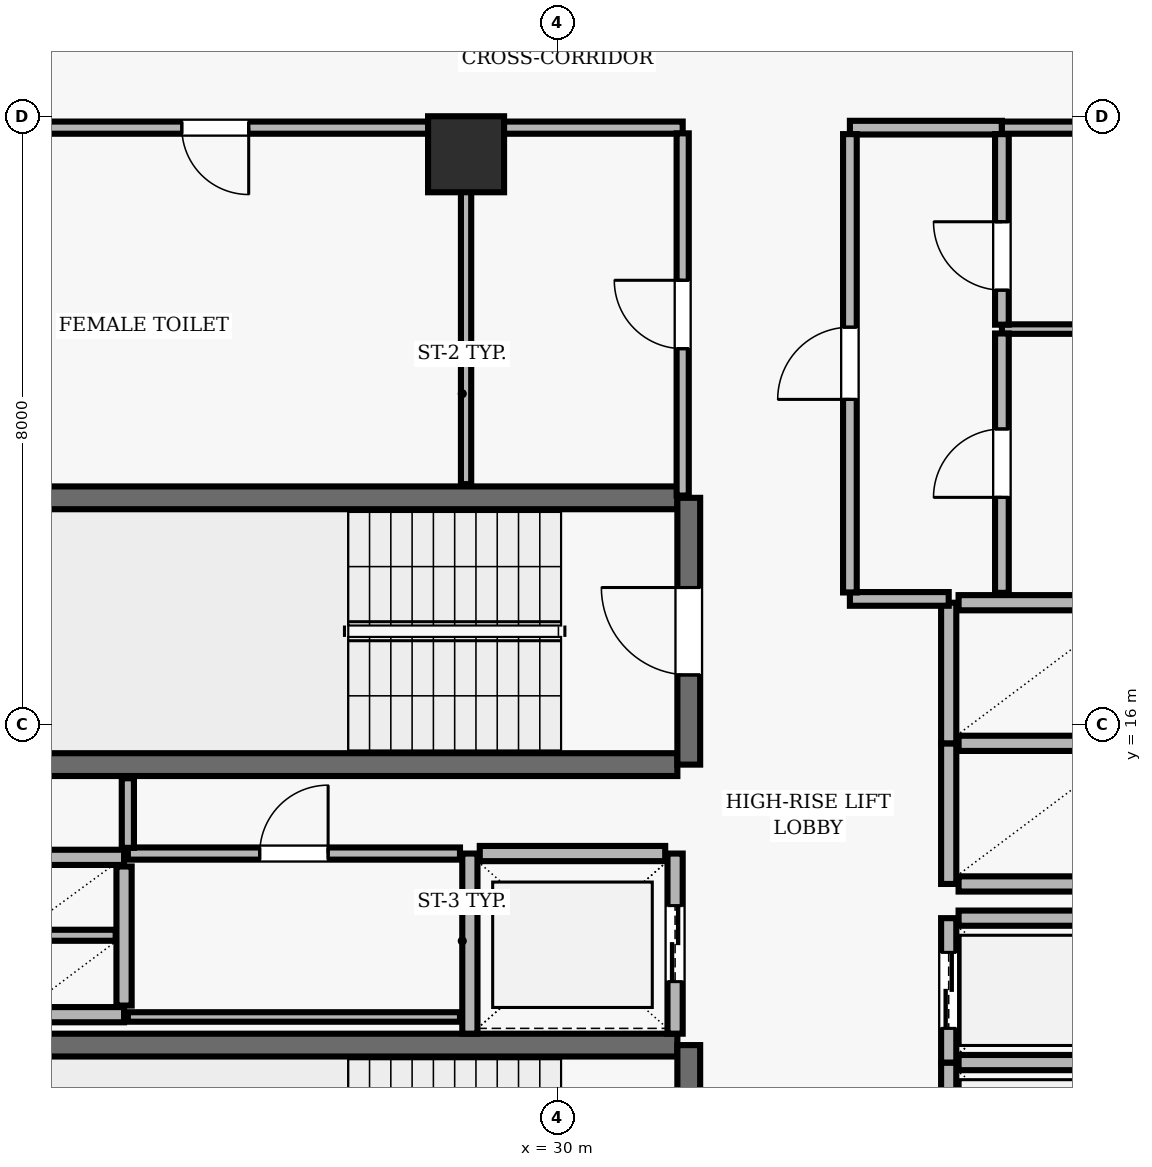
"""IFC4 building model, lengths in metres.
Left out: names, types, materials, properties, quantities, classifications, styles, units other than length and angle.
Written with IfcOpenShell. Run it as: python <this file> out.ifc"""

import sys

from ifc_helpers import new_model, si_unit, direction, frame, frame_2d, origin, origin_2d, place, context, subcontext, project, spatial, rectangle, extrude, element, fill, save


model = new_model("IFC4")
c1 = context("Model", 3, precision=1e-05, world=origin(), true_north=direction((0.0, 1.0)))
c2 = subcontext(c1, "Body", "Model", "MODEL_VIEW")
j1 = project(units=[si_unit("LENGTHUNIT", "METRE"), si_unit("PLANEANGLEUNIT", "RADIAN")], contexts=[c1])
p1 = place(None, origin())
s1 = spatial("IfcSite", under=j1, at=p1, CompositionType="ELEMENT")
p2 = place(p1, origin())
s2 = spatial("IfcBuilding", under=s1, at=p2, CompositionType="ELEMENT")
p3 = place(p2, frame((0.0, 0.0, 230.4)))
s3 = spatial("IfcBuildingStorey", under=s2, at=p3, CompositionType="ELEMENT", Elevation=230.4)
p4 = place(p3, frame((28.8, 23.5, 0.0), z_axis=(0.0, 0.0, 1.0), x_axis=(1.0, 0.0, 0.0)))
e1 = element("IfcColumn", 1, at=p4, inside=s3, PredefinedType="COLUMN", context=c2, shape_type="SweptSolid", body=[
    extrude(rectangle(XDim=1.0, YDim=1.0, at=origin_2d()), origin(), (0.0, 0.0, 1.0), 3.9),
])
for number, where, z_axis, x_axis in (
    (2, (31.58, 18.98, 0.0), (0.0, 0.0, 1.0), (-1.0, 0.0, 0.0)),
    (3, (23.22, 15.47, 0.0), (0.0, 0.0, 1.0), (1.0, 0.0, 0.0)),
):
    element("IfcWall", number, at=place(p3, frame(where, z_axis=z_axis, x_axis=x_axis)), inside=s3, PredefinedType="SHEAR", context=c2, shape_type="SweptSolid", body=[
        extrude(rectangle(XDim=8.36, YDim=0.3, at=frame_2d((4.18, 0.0))), origin(), (0.0, 0.0, 1.0), 3.69),
    ])
p5 = place(p3, frame((31.73, 15.47, 0.0), z_axis=(0.0, 0.0, 1.0), x_axis=(0.0, 1.0, 0.0)))
e4 = element("IfcWall", 4, at=p5, inside=s3, PredefinedType="SHEAR", context=c2, shape_type="SweptSolid", body=[
    extrude(rectangle(XDim=3.51, YDim=0.3, at=frame_2d((1.755, 0.0))), origin(), (0.0, 0.0, 1.0), 3.69),
])
p6 = place(p5, frame((1.18, 0.0, 0.0)))
e5 = element("IfcOpeningElement", 5, at=p6, cuts=e4, PredefinedType="OPENING", context=c2, shape_type="SweptSolid", body=[
    extrude(rectangle(XDim=1.15, YDim=2.15, at=frame_2d((0.575, 1.075))), frame((0.0, 0.16, 0.0), z_axis=(0.0, -1.0, 0.0), x_axis=(1.0, 0.0, 0.0)), (0.0, 0.0, 1.0), 0.32),
])
p7 = place(p3, frame((31.58, 11.78, 0.0), z_axis=(0.0, 0.0, 1.0), x_axis=(-1.0, 0.0, 0.0)))
e6 = element("IfcWall", 6, at=p7, inside=s3, PredefinedType="SHEAR", context=c2, shape_type="SweptSolid", body=[
    extrude(rectangle(XDim=8.36, YDim=0.3, at=frame_2d((4.18, 0.0))), origin(), (0.0, 0.0, 1.0), 3.69),
])
p8 = place(p3, frame((31.73, 8.27, 0.0), z_axis=(0.0, 0.0, 1.0), x_axis=(0.0, 1.0, 0.0)))
e7 = element("IfcWall", 7, at=p8, inside=s3, PredefinedType="SHEAR", context=c2, shape_type="SweptSolid", body=[
    extrude(rectangle(XDim=3.51, YDim=0.3, at=frame_2d((1.755, 0.0))), origin(), (0.0, 0.0, 1.0), 3.69),
])
p9 = place(p8, frame((1.18, 0.0, 0.0)))
e8 = element("IfcOpeningElement", 8, at=p9, cuts=e7, PredefinedType="OPENING", context=c2, shape_type="SweptSolid", body=[
    extrude(rectangle(XDim=1.15, YDim=2.15, at=frame_2d((0.575, 1.075))), frame((0.0, 0.16, 0.0), z_axis=(0.0, -1.0, 0.0), x_axis=(1.0, 0.0, 0.0)), (0.0, 0.0, 1.0), 0.32),
])
p10 = place(p3, frame((35.15, 11.55, 0.0), z_axis=(0.0, 0.0, 1.0), x_axis=(0.0, -1.0, 0.0)))
e9 = element("IfcWall", 9, at=p10, inside=s3, PredefinedType="SOLIDWALL", context=c2, shape_type="SweptSolid", body=[
    extrude(rectangle(XDim=1.9, YDim=0.2, at=frame_2d((0.95, 0.0))), origin(), (0.0, 0.0, 1.0), 3.69),
])
p11 = place(p10, frame((0.45, 0.0, 0.0)))
e10 = element("IfcOpeningElement", 10, at=p11, cuts=e9, PredefinedType="OPENING", context=c2, shape_type="SweptSolid", body=[
    extrude(rectangle(XDim=1.0, YDim=2.1, at=frame_2d((0.5, 1.05))), frame((0.0, 0.11, 0.0), z_axis=(0.0, -1.0, 0.0), x_axis=(1.0, 0.0, 0.0)), (0.0, 0.0, 1.0), 0.22),
])
p12 = place(p3, frame((37.42, 11.55, 0.0), z_axis=(0.0, 0.0, 1.0), x_axis=(-1.0, 0.0, 0.0)))
e11 = element("IfcWall", 11, at=p12, inside=s3, PredefinedType="SOLIDWALL", context=c2, shape_type="SweptSolid", body=[
    extrude(rectangle(XDim=2.14, YDim=0.2, at=frame_2d((1.07, 0.0))), origin(), (0.0, 0.0, 1.0), 3.69),
])
p13 = place(p3, frame((35.15, 13.45, 0.0), z_axis=(0.0, 0.0, 1.0), x_axis=(0.0, -1.0, 0.0)))
e12 = element("IfcWall", 12, at=p13, inside=s3, PredefinedType="SOLIDWALL", context=c2, shape_type="SweptSolid", body=[
    extrude(rectangle(XDim=1.9, YDim=0.2, at=frame_2d((0.95, 0.0))), origin(), (0.0, 0.0, 1.0), 3.69),
])
p14 = place(p13, frame((0.45, 0.0, 0.0)))
e13 = element("IfcOpeningElement", 13, at=p14, cuts=e12, PredefinedType="OPENING", context=c2, shape_type="SweptSolid", body=[
    extrude(rectangle(XDim=1.0, YDim=2.1, at=frame_2d((0.5, 1.05))), frame((0.0, 0.11, 0.0), z_axis=(0.0, -1.0, 0.0), x_axis=(1.0, 0.0, 0.0)), (0.0, 0.0, 1.0), 0.22),
])
p15 = place(p3, frame((37.42, 13.45, 0.0), z_axis=(0.0, 0.0, 1.0), x_axis=(-1.0, 0.0, 0.0)))
e14 = element("IfcWall", 14, at=p15, inside=s3, PredefinedType="SOLIDWALL", context=c2, shape_type="SweptSolid", body=[
    extrude(rectangle(XDim=2.14, YDim=0.2, at=frame_2d((1.07, 0.0))), origin(), (0.0, 0.0, 1.0), 3.69),
])
p16 = place(p3, frame((28.85, 14.3, 0.0), z_axis=(0.0, 0.0, 1.0), x_axis=(0.0, -1.0, 0.0)))
e15 = element("IfcWall", 15, at=p16, inside=s3, PredefinedType="SOLIDWALL", context=c2, shape_type="SweptSolid", body=[
    extrude(rectangle(XDim=2.37, YDim=0.2, at=frame_2d((1.185, 0.0))), origin(), (0.0, 0.0, 1.0), 3.69),
])
p17 = place(p3, frame((31.55, 11.93, 0.0), z_axis=(0.0, 0.0, 1.0), x_axis=(0.0, 1.0, 0.0)))
e16 = element("IfcWall", 16, at=p17, inside=s3, PredefinedType="SOLIDWALL", context=c2, shape_type="SweptSolid", body=[
    extrude(rectangle(XDim=2.37, YDim=0.2, at=frame_2d((1.185, 0.0))), origin(), (0.0, 0.0, 1.0), 3.69),
])
p18 = place(p17, frame((0.685, 0.0, 0.0)))
e17 = element("IfcOpeningElement", 17, at=p18, cuts=e16, PredefinedType="OPENING", context=c2, shape_type="SweptSolid", body=[
    extrude(rectangle(XDim=1.0, YDim=2.1, at=frame_2d((0.5, 1.05))), frame((0.0, 0.11, 0.0), z_axis=(0.0, -1.0, 0.0), x_axis=(1.0, 0.0, 0.0)), (0.0, 0.0, 1.0), 0.22),
])
p19 = place(p3, frame((31.42, 14.3, 0.0), z_axis=(0.0, 0.0, 1.0), x_axis=(-1.0, 0.0, 0.0)))
e18 = element("IfcWall", 18, at=p19, inside=s3, PredefinedType="SOLIDWALL", context=c2, shape_type="SweptSolid", body=[
    extrude(rectangle(XDim=2.44, YDim=0.2, at=frame_2d((1.22, 0.0))), origin(), (0.0, 0.0, 1.0), 3.69),
])
p20 = place(p3, frame((35.15, 15.75, 0.0), z_axis=(0.0, 0.0, 1.0), x_axis=(0.0, -1.0, 0.0)))
e19 = element("IfcWall", 19, at=p20, inside=s3, PredefinedType="SOLIDWALL", context=c2, shape_type="SweptSolid", body=[
    extrude(rectangle(XDim=1.85, YDim=0.2, at=frame_2d((0.925, 0.0))), origin(), (0.0, 0.0, 1.0), 3.69),
])
for number, where, z_axis, x_axis in (
    (20, (35.28, 13.9, 0.0), (0.0, 0.0, 1.0), (1.0, 0.0, 0.0)),
    (21, (37.42, 15.75, 0.0), (0.0, 0.0, 1.0), (-1.0, 0.0, 0.0)),
):
    element("IfcWall", number, at=place(p3, frame(where, z_axis=z_axis, x_axis=x_axis)), inside=s3, PredefinedType="SOLIDWALL", context=c2, shape_type="SweptSolid", body=[
        extrude(rectangle(XDim=2.14, YDim=0.2, at=frame_2d((1.07, 0.0))), origin(), (0.0, 0.0, 1.0), 3.69),
    ])
p21 = place(p3, frame((35.15, 17.6, 0.0), z_axis=(0.0, 0.0, 1.0), x_axis=(0.0, -1.0, 0.0)))
e22 = element("IfcWall", 22, at=p21, inside=s3, PredefinedType="SOLIDWALL", context=c2, shape_type="SweptSolid", body=[
    extrude(rectangle(XDim=1.85, YDim=0.2, at=frame_2d((0.925, 0.0))), origin(), (0.0, 0.0, 1.0), 3.69),
])
p22 = place(p3, frame((37.42, 17.6, 0.0), z_axis=(0.0, 0.0, 1.0), x_axis=(-1.0, 0.0, 0.0)))
e23 = element("IfcWall", 23, at=p22, inside=s3, PredefinedType="SOLIDWALL", context=c2, shape_type="SweptSolid", body=[
    extrude(rectangle(XDim=2.14, YDim=0.2, at=frame_2d((1.07, 0.0))), origin(), (0.0, 0.0, 1.0), 3.69),
])
for number, where, z_axis, x_axis in (
    (24, (22.9, 14.25, 0.0), (0.0, 0.0, 1.0), (1.0, 0.0, 0.0)),
    (25, (22.9, 12.18, 0.0), (0.0, 0.0, 1.0), (1.0, 0.0, 0.0)),
):
    element("IfcWall", number, at=place(p3, frame(where, z_axis=z_axis, x_axis=x_axis)), inside=s3, PredefinedType="SOLIDWALL", context=c2, shape_type="SweptSolid", body=[
        extrude(rectangle(XDim=1.4, YDim=0.2, at=frame_2d((0.7, 0.0))), origin(), (0.0, 0.0, 1.0), 3.69),
    ])
p23 = place(p3, frame((24.3, 12.3, 0.0), z_axis=(0.0, 0.0, 1.0), x_axis=(0.0, 1.0, 0.0)))
e26 = element("IfcWall", 26, at=p23, inside=s3, PredefinedType="SOLIDWALL", context=c2, shape_type="SweptSolid", body=[
    extrude(rectangle(XDim=1.83, YDim=0.2, at=frame_2d((0.915, 0.0))), origin(), (0.0, 0.0, 1.0), 3.69),
])
p24 = place(p3, frame((23.01, 13.225, 0.0), z_axis=(0.0, 0.0, 1.0), x_axis=(1.0, 0.0, 0.0)))
e27 = element("IfcWall", 27, at=p24, inside=s3, PredefinedType="PARTITIONING", context=c2, shape_type="SweptSolid", body=[
    extrude(rectangle(XDim=1.18, YDim=0.145, at=frame_2d((0.59, 0.0))), origin(), (0.0, 0.0, 1.0), 3.69),
])
p25 = place(p3, frame((24.35, 12.15, 0.0), z_axis=(0.0, 0.0, 1.0), x_axis=(1.0, 0.0, 0.0)))
e28 = element("IfcWall", 28, at=p25, inside=s3, PredefinedType="PARTITIONING", context=c2, shape_type="SweptSolid", body=[
    extrude(rectangle(XDim=4.37, YDim=0.125, at=frame_2d((2.185, 0.0))), origin(), (0.0, 0.0, 1.0), 3.69),
])
p26 = place(p3, frame((24.35, 14.3, 0.0), z_axis=(0.0, 0.0, 1.0), x_axis=(1.0, 0.0, 0.0)))
e29 = element("IfcWall", 29, at=p26, inside=s3, PredefinedType="PARTITIONING", context=c2, shape_type="SweptSolid", body=[
    extrude(rectangle(XDim=4.37, YDim=0.16, at=frame_2d((2.185, 0.0))), origin(), (0.0, 0.0, 1.0), 3.69),
])
p27 = place(p26, frame((1.735, 0.0, 0.0)))
e30 = element("IfcOpeningElement", 30, at=p27, cuts=e29, PredefinedType="OPENING", context=c2, shape_type="SweptSolid", body=[
    extrude(rectangle(XDim=0.9, YDim=2.1, at=frame_2d((0.45, 1.05))), frame((0.0, 0.09, 0.0), z_axis=(0.0, -1.0, 0.0), x_axis=(1.0, 0.0, 0.0)), (0.0, 0.0, 1.0), 0.18),
])
p28 = place(p3, frame((28.8, 23.85, 0.0), z_axis=(0.0, 0.0, 1.0), x_axis=(-1.0, 0.0, 0.0)))
e31 = element("IfcWall", 31, at=p28, inside=s3, PredefinedType="PARTITIONING", context=c2, shape_type="SweptSolid", body=[
    extrude(rectangle(XDim=6.6, YDim=0.16, at=frame_2d((3.3, 0.0))), origin(), (0.0, 0.0, 1.0), 3.139),
])
p29 = place(p28, frame((2.86, 0.0, 0.0)))
e32 = element("IfcOpeningElement", 32, at=p29, cuts=e31, PredefinedType="OPENING", context=c2, shape_type="SweptSolid", body=[
    extrude(rectangle(XDim=0.88, YDim=2.1, at=frame_2d((0.44, 1.05))), frame((0.0, 0.09, 0.0), z_axis=(0.0, -1.0, 0.0), x_axis=(1.0, 0.0, 0.0)), (0.0, 0.0, 1.0), 0.18),
])
p30 = place(p3, frame((31.65, 23.85, 0.0), z_axis=(0.0, 0.0, 1.0), x_axis=(-1.0, 0.0, 0.0)))
e33 = element("IfcWall", 33, at=p30, inside=s3, PredefinedType="PARTITIONING", context=c2, shape_type="SweptSolid", body=[
    extrude(rectangle(XDim=2.85, YDim=0.16, at=frame_2d((1.425, 0.0))), origin(), (0.0, 0.0, 1.0), 3.139),
])
p31 = place(p3, frame((33.85, 17.65, 0.0), z_axis=(0.0, 0.0, 1.0), x_axis=(1.0, 0.0, 0.0)))
e34 = element("IfcWall", 34, at=p31, inside=s3, PredefinedType="PARTITIONING", context=c2, shape_type="SweptSolid", body=[
    extrude(rectangle(XDim=1.3, YDim=0.18, at=frame_2d((0.65, 0.0))), origin(), (0.0, 0.0, 1.0), 3.69),
])
p32 = place(p3, frame((35.85, 21.2, 0.0), z_axis=(0.0, 0.0, 1.0), x_axis=(1.0, 0.0, 0.0)))
e35 = element("IfcWall", 35, at=p32, inside=s3, PredefinedType="PARTITIONING", context=c2, shape_type="SweptSolid", body=[
    extrude(rectangle(XDim=2.0, YDim=0.125, at=frame_2d((1.0, 0.0))), origin(), (0.0, 0.0, 1.0), 3.69),
])
p33 = place(p3, frame((35.85, 23.85, 0.0), z_axis=(0.0, 0.0, 1.0), x_axis=(-1.0, 0.0, 0.0)))
e36 = element("IfcWall", 36, at=p33, inside=s3, PredefinedType="PARTITIONING", context=c2, shape_type="SweptSolid", body=[
    extrude(rectangle(XDim=2.0, YDim=0.18, at=frame_2d((1.0, 0.0))), origin(), (0.0, 0.0, 1.0), 3.139),
])
p34 = place(p3, frame((37.85, 23.85, 0.0), z_axis=(0.0, 0.0, 1.0), x_axis=(-1.0, 0.0, 0.0)))
e37 = element("IfcWall", 37, at=p34, inside=s3, PredefinedType="PARTITIONING", context=c2, shape_type="SweptSolid", body=[
    extrude(rectangle(XDim=2.0, YDim=0.16, at=frame_2d((1.0, 0.0))), origin(), (0.0, 0.0, 1.0), 3.139),
])
p35 = place(p3, frame((24.35, 15.29, 0.0), z_axis=(0.0, 0.0, 1.0), x_axis=(0.0, -1.0, 0.0)))
e38 = element("IfcWall", 38, at=p35, inside=s3, PredefinedType="PARTITIONING", context=c2, shape_type="SweptSolid", body=[
    extrude(rectangle(XDim=0.915, YDim=0.16, at=frame_2d((0.458, 0.0))), origin(), (0.0, 0.0, 1.0), 3.69),
])
p36 = place(p3, frame((28.8, 23.775, 0.0), z_axis=(0.0, 0.0, 1.0), x_axis=(0.0, -1.0, 0.0)))
e39 = element("IfcWall", 39, at=p36, inside=s3, PredefinedType="PARTITIONING", context=c2, shape_type="SweptSolid", body=[
    extrude(rectangle(XDim=4.615, YDim=0.135, at=frame_2d((2.308, 0.0))), origin(), (0.0, 0.0, 1.0), 3.69),
])
p37 = place(p3, frame((31.65, 19.01, 0.0), z_axis=(0.0, 0.0, 1.0), x_axis=(0.0, 1.0, 0.0)))
e40 = element("IfcWall", 40, at=p37, inside=s3, PredefinedType="PARTITIONING", context=c2, shape_type="SweptSolid", body=[
    extrude(rectangle(XDim=4.765, YDim=0.16, at=frame_2d((2.382, 0.0))), origin(), (0.0, 0.0, 1.0), 3.69),
])
p38 = place(p37, frame((1.932, 0.0, 0.0)))
e41 = element("IfcOpeningElement", 41, at=p38, cuts=e40, PredefinedType="OPENING", context=c2, shape_type="SweptSolid", body=[
    extrude(rectangle(XDim=0.9, YDim=2.1, at=frame_2d((0.45, 1.05))), frame((0.0, 0.09, 0.0), z_axis=(0.0, -1.0, 0.0), x_axis=(1.0, 0.0, 0.0)), (0.0, 0.0, 1.0), 0.18),
])
p39 = place(p3, frame((33.85, 17.735, 0.0), z_axis=(0.0, 0.0, 1.0), x_axis=(0.0, 1.0, 0.0)))
e42 = element("IfcWall", 42, at=p39, inside=s3, PredefinedType="PARTITIONING", context=c2, shape_type="SweptSolid", body=[
    extrude(rectangle(XDim=6.03, YDim=0.18, at=frame_2d((3.015, 0.0))), origin(), (0.0, 0.0, 1.0), 3.69),
])
p40 = place(p39, frame((2.54, 0.0, 0.0)))
e43 = element("IfcOpeningElement", 43, at=p40, cuts=e42, PredefinedType="OPENING", context=c2, shape_type="SweptSolid", body=[
    extrude(rectangle(XDim=0.95, YDim=2.1, at=frame_2d((0.475, 1.05))), frame((0.0, 0.1, 0.0), z_axis=(0.0, -1.0, 0.0), x_axis=(1.0, 0.0, 0.0)), (0.0, 0.0, 1.0), 0.2),
])
p41 = place(p3, frame((35.85, 17.73, 0.0), z_axis=(0.0, 0.0, 1.0), x_axis=(0.0, 1.0, 0.0)))
e44 = element("IfcWall", 44, at=p41, inside=s3, PredefinedType="PARTITIONING", context=c2, shape_type="SweptSolid", body=[
    extrude(rectangle(XDim=3.412, YDim=0.18, at=frame_2d((1.706, 0.0))), origin(), (0.0, 0.0, 1.0), 3.69),
])
p42 = place(p41, frame((1.256, 0.0, 0.0)))
e45 = element("IfcOpeningElement", 45, at=p42, cuts=e44, PredefinedType="OPENING", context=c2, shape_type="SweptSolid", body=[
    extrude(rectangle(XDim=0.9, YDim=2.1, at=frame_2d((0.45, 1.05))), frame((0.0, 0.1, 0.0), z_axis=(0.0, -1.0, 0.0), x_axis=(1.0, 0.0, 0.0)), (0.0, 0.0, 1.0), 0.2),
])
p43 = place(p3, frame((35.85, 21.258, 0.0), z_axis=(0.0, 0.0, 1.0), x_axis=(0.0, 1.0, 0.0)))
e46 = element("IfcWall", 46, at=p43, inside=s3, PredefinedType="PARTITIONING", context=c2, shape_type="SweptSolid", body=[
    extrude(rectangle(XDim=2.507, YDim=0.18, at=frame_2d((1.253, 0.0))), origin(), (0.0, 0.0, 1.0), 3.69),
])
p44 = place(p43, frame((0.454, 0.0, 0.0)))
e47 = element("IfcOpeningElement", 47, at=p44, cuts=e46, PredefinedType="OPENING", context=c2, shape_type="SweptSolid", body=[
    extrude(rectangle(XDim=0.9, YDim=2.1, at=frame_2d((0.45, 1.05))), frame((0.0, 0.1, 0.0), z_axis=(0.0, -1.0, 0.0), x_axis=(1.0, 0.0, 0.0)), (0.0, 0.0, 1.0), 0.2),
])
p45 = place(p6, origin())
e48 = element("IfcDoor", 48, at=p45, inside=s3, OperationType="SINGLE_SWING_RIGHT", PredefinedType="DOOR", context=c2, shape_type="SweptSolid", body=[
    extrude(rectangle(XDim=1.15, YDim=2.15, at=frame_2d((0.575, 1.075))), frame((0.0, 0.025, 0.0), z_axis=(0.0, -1.0, 0.0), x_axis=(1.0, 0.0, 0.0)), (0.0, 0.0, 1.0), 0.05),
])
fill(e5, e48)
p46 = place(p14, origin())
e49 = element("IfcDoor", 49, at=p46, inside=s3, OperationType="DOUBLE_DOOR_SLIDING", PredefinedType="DOOR", context=c2, shape_type="SweptSolid", body=[
    extrude(rectangle(XDim=1.0, YDim=2.1, at=frame_2d((0.5, 1.05))), frame((0.0, 0.025, 0.0), z_axis=(0.0, -1.0, 0.0), x_axis=(1.0, 0.0, 0.0)), (0.0, 0.0, 1.0), 0.05),
])
fill(e13, e49)
p47 = place(p18, origin())
e50 = element("IfcDoor", 50, at=p47, inside=s3, OperationType="DOUBLE_DOOR_SLIDING", PredefinedType="DOOR", context=c2, shape_type="SweptSolid", body=[
    extrude(rectangle(XDim=1.0, YDim=2.1, at=frame_2d((0.5, 1.05))), frame((0.0, 0.025, 0.0), z_axis=(0.0, -1.0, 0.0), x_axis=(1.0, 0.0, 0.0)), (0.0, 0.0, 1.0), 0.05),
])
fill(e17, e50)
p48 = place(p40, origin())
e51 = element("IfcDoor", 51, at=p48, inside=s3, OperationType="SINGLE_SWING_LEFT", PredefinedType="DOOR", context=c2, shape_type="SweptSolid", body=[
    extrude(rectangle(XDim=0.95, YDim=2.1, at=frame_2d((0.475, 1.05))), frame((0.0, 0.025, 0.0), z_axis=(0.0, -1.0, 0.0), x_axis=(1.0, 0.0, 0.0)), (0.0, 0.0, 1.0), 0.05),
])
fill(e43, e51)
p49 = place(p44, origin())
e52 = element("IfcDoor", 52, at=p49, inside=s3, OperationType="SINGLE_SWING_RIGHT", PredefinedType="DOOR", context=c2, shape_type="SweptSolid", body=[
    extrude(rectangle(XDim=0.9, YDim=2.1, at=frame_2d((0.45, 1.05))), frame((0.0, 0.025, 0.0), z_axis=(0.0, -1.0, 0.0), x_axis=(1.0, 0.0, 0.0)), (0.0, 0.0, 1.0), 0.05),
])
fill(e47, e52)
p50 = place(p42, origin())
e53 = element("IfcDoor", 53, at=p50, inside=s3, OperationType="SINGLE_SWING_LEFT", PredefinedType="DOOR", context=c2, shape_type="SweptSolid", body=[
    extrude(rectangle(XDim=0.9, YDim=2.1, at=frame_2d((0.45, 1.05))), frame((0.0, 0.025, 0.0), z_axis=(0.0, -1.0, 0.0), x_axis=(1.0, 0.0, 0.0)), (0.0, 0.0, 1.0), 0.05),
])
fill(e45, e53)
p51 = place(p38, origin())
e54 = element("IfcDoor", 54, at=p51, inside=s3, OperationType="SINGLE_SWING_RIGHT", PredefinedType="DOOR", context=c2, shape_type="SweptSolid", body=[
    extrude(rectangle(XDim=0.9, YDim=2.1, at=frame_2d((0.45, 1.05))), frame((0.0, 0.025, 0.0), z_axis=(0.0, -1.0, 0.0), x_axis=(1.0, 0.0, 0.0)), (0.0, 0.0, 1.0), 0.05),
])
fill(e41, e54)
p52 = place(p27, origin())
e55 = element("IfcDoor", 55, at=p52, inside=s3, OperationType="SINGLE_SWING_RIGHT", PredefinedType="DOOR", context=c2, shape_type="SweptSolid", body=[
    extrude(rectangle(XDim=0.9, YDim=2.1, at=frame_2d((0.45, 1.05))), frame((0.0, 0.025, 0.0), z_axis=(0.0, -1.0, 0.0), x_axis=(1.0, 0.0, 0.0)), (0.0, 0.0, 1.0), 0.05),
])
fill(e30, e55)
p53 = place(p29, origin())
e56 = element("IfcDoor", 56, at=p53, inside=s3, OperationType="SINGLE_SWING_LEFT", PredefinedType="DOOR", context=c2, shape_type="SweptSolid", body=[
    extrude(rectangle(XDim=0.88, YDim=2.1, at=frame_2d((0.44, 1.05))), frame((0.0, 0.025, 0.0), z_axis=(0.0, -1.0, 0.0), x_axis=(1.0, 0.0, 0.0)), (0.0, 0.0, 1.0), 0.05),
])
fill(e32, e56)
save(model, sys.argv[1])
